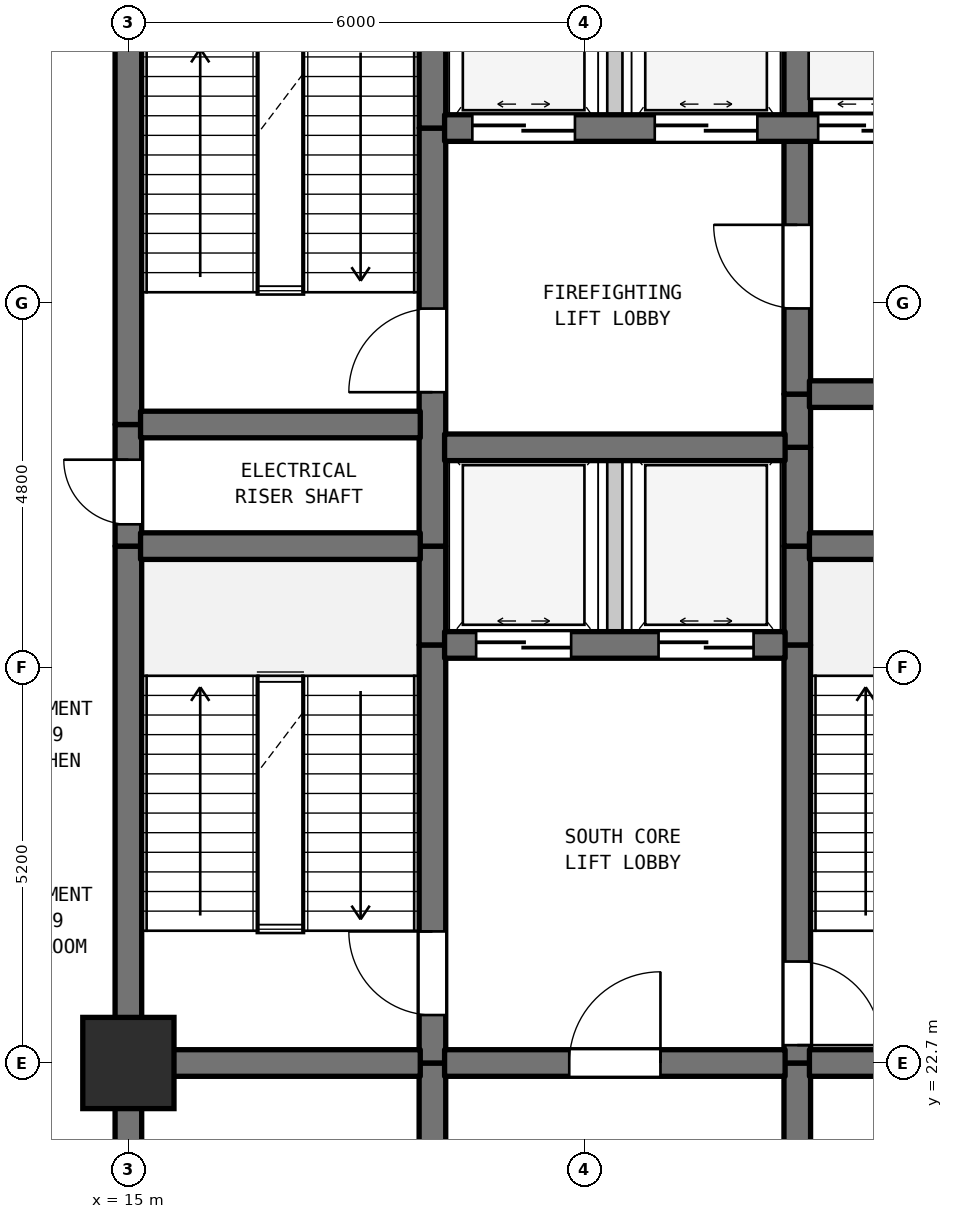
"""IFC4 building model, lengths in metres.
Left out: names, types, materials, properties, quantities, classifications, styles, units other than length and angle.
Written with IfcOpenShell. Run it as: python <this file> out.ifc"""

import sys

from ifc_helpers import new_model, si_unit, direction, frame, frame_2d, origin, origin_2d, place, context, subcontext, project, spatial, rectangle, extrude, element, fill, save


model = new_model("IFC4")
c1 = context("Model", 3, precision=1e-05, world=origin(), true_north=direction((0.0, 1.0)))
c2 = subcontext(c1, "Body", "Model", "MODEL_VIEW")
j1 = project(units=[si_unit("LENGTHUNIT", "METRE"), si_unit("PLANEANGLEUNIT", "RADIAN")], contexts=[c1])
p1 = place(None, origin())
s1 = spatial("IfcSite", under=j1, at=p1, CompositionType="ELEMENT")
p2 = place(p1, origin())
s2 = spatial("IfcBuilding", under=s1, at=p2, CompositionType="ELEMENT")
p3 = place(p2, frame((0.0, 0.0, 81.2)))
s3 = spatial("IfcBuildingStorey", under=s2, at=p3, CompositionType="ELEMENT", Elevation=81.2)
p4 = place(p3, frame((15.0, 22.7, 0.0), z_axis=(0.0, 0.0, 1.0), x_axis=(1.0, 0.0, 0.0)))
e1 = element("IfcColumn", 1, at=p4, inside=s3, PredefinedType="COLUMN", context=c2, shape_type="SweptSolid", body=[
    extrude(rectangle(XDim=1.2, YDim=1.2, at=origin_2d()), origin(), (0.0, 0.0, 1.0), 5.2),
])
p5 = place(p3, frame((15.0, 19.5, 0.0), z_axis=(0.0, 0.0, 1.0), x_axis=(0.0, 1.0, 0.0)))
e2 = element("IfcWall", 2, at=p5, inside=s3, PredefinedType="SHEAR", context=c2, shape_type="SweptSolid", body=[
    extrude(rectangle(XDim=3.2, YDim=0.35, at=frame_2d((1.6, 0.0))), origin(), (0.0, 0.0, 1.0), 4.885),
])
p6 = place(p3, frame((15.0, 22.7, 0.0), z_axis=(0.0, 0.0, 1.0), x_axis=(0.0, 1.0, 0.0)))
e3 = element("IfcWall", 3, at=p6, inside=s3, PredefinedType="SHEAR", context=c2, shape_type="SweptSolid", body=[
    extrude(rectangle(XDim=6.8, YDim=0.35, at=frame_2d((3.4, 0.0))), origin(), (0.0, 0.0, 1.0), 4.885),
])
p7 = place(p3, frame((15.0, 29.5, 0.0), z_axis=(0.0, 0.0, 1.0), x_axis=(0.0, 1.0, 0.0)))
e4 = element("IfcWall", 4, at=p7, inside=s3, PredefinedType="SHEAR", context=c2, shape_type="SweptSolid", body=[
    extrude(rectangle(XDim=1.6, YDim=0.35, at=frame_2d((0.8, 0.0))), origin(), (0.0, 0.0, 1.0), 4.885),
])
p8 = place(p7, frame((0.287, 0.0, 0.0)))
e5 = element("IfcOpeningElement", 5, at=p8, cuts=e4, PredefinedType="OPENING", context=c2, shape_type="SweptSolid", body=[
    extrude(rectangle(XDim=0.85, YDim=2.1, at=frame_2d((0.425, 1.05))), frame((0.0, 0.185, 0.0), z_axis=(0.0, -1.0, 0.0), x_axis=(1.0, 0.0, 0.0)), (0.0, 0.0, 1.0), 0.37),
])
p9 = place(p3, frame((15.0, 31.1, 0.0), z_axis=(0.0, 0.0, 1.0), x_axis=(0.0, 1.0, 0.0)))
e6 = element("IfcWall", 6, at=p9, inside=s3, PredefinedType="SHEAR", context=c2, shape_type="SweptSolid", body=[
    extrude(rectangle(XDim=6.8, YDim=0.35, at=frame_2d((3.4, 0.0))), origin(), (0.0, 0.0, 1.0), 4.885),
])
p10 = place(p3, frame((19.0, 19.5, 0.0), z_axis=(0.0, 0.0, 1.0), x_axis=(0.0, 1.0, 0.0)))
e7 = element("IfcWall", 7, at=p10, inside=s3, PredefinedType="SHEAR", context=c2, shape_type="SweptSolid", body=[
    extrude(rectangle(XDim=3.2, YDim=0.35, at=frame_2d((1.6, 0.0))), origin(), (0.0, 0.0, 1.0), 4.885),
])
p11 = place(p3, frame((19.0, 22.7, 0.0), z_axis=(0.0, 0.0, 1.0), x_axis=(0.0, 1.0, 0.0)))
e8 = element("IfcWall", 8, at=p11, inside=s3, PredefinedType="SHEAR", context=c2, shape_type="SweptSolid", body=[
    extrude(rectangle(XDim=5.5, YDim=0.35, at=frame_2d((2.75, 0.0))), origin(), (0.0, 0.0, 1.0), 4.885),
])
p12 = place(p11, frame((0.631, 0.0, 0.0)))
e9 = element("IfcOpeningElement", 9, at=p12, cuts=e8, PredefinedType="OPENING", context=c2, shape_type="SweptSolid", body=[
    extrude(rectangle(XDim=1.1, YDim=2.15, at=frame_2d((0.55, 1.075))), frame((0.0, 0.185, 0.0), z_axis=(0.0, -1.0, 0.0), x_axis=(1.0, 0.0, 0.0)), (0.0, 0.0, 1.0), 0.37),
])
p13 = place(p3, frame((19.0, 28.2, 0.0), z_axis=(0.0, 0.0, 1.0), x_axis=(0.0, 1.0, 0.0)))
e10 = element("IfcWall", 10, at=p13, inside=s3, PredefinedType="SHEAR", context=c2, shape_type="SweptSolid", body=[
    extrude(rectangle(XDim=1.3, YDim=0.35, at=frame_2d((0.65, 0.0))), origin(), (0.0, 0.0, 1.0), 4.885),
])
p14 = place(p3, frame((19.0, 29.5, 0.0), z_axis=(0.0, 0.0, 1.0), x_axis=(0.0, 1.0, 0.0)))
e11 = element("IfcWall", 11, at=p14, inside=s3, PredefinedType="SHEAR", context=c2, shape_type="SweptSolid", body=[
    extrude(rectangle(XDim=5.5, YDim=0.35, at=frame_2d((2.75, 0.0))), origin(), (0.0, 0.0, 1.0), 4.885),
])
p15 = place(p14, frame((2.025, 0.0, 0.0)))
e12 = element("IfcOpeningElement", 12, at=p15, cuts=e11, PredefinedType="OPENING", context=c2, shape_type="SweptSolid", body=[
    extrude(rectangle(XDim=1.1, YDim=2.15, at=frame_2d((0.55, 1.075))), frame((0.0, 0.185, 0.0), z_axis=(0.0, -1.0, 0.0), x_axis=(1.0, 0.0, 0.0)), (0.0, 0.0, 1.0), 0.37),
])
p16 = place(p3, frame((19.0, 35.0, 0.0), z_axis=(0.0, 0.0, 1.0), x_axis=(0.0, 1.0, 0.0)))
e13 = element("IfcWall", 13, at=p16, inside=s3, PredefinedType="SHEAR", context=c2, shape_type="SweptSolid", body=[
    extrude(rectangle(XDim=2.9, YDim=0.35, at=frame_2d((1.45, 0.0))), origin(), (0.0, 0.0, 1.0), 4.885),
])
p17 = place(p3, frame((21.4, 28.2, 0.0), z_axis=(0.0, 0.0, 1.0), x_axis=(0.0, 1.0, 0.0)))
e14 = element("IfcWall", 14, at=p17, inside=s3, PredefinedType="STANDARD", context=c2, shape_type="SweptSolid", body=[
    extrude(rectangle(XDim=2.6, YDim=0.2, at=frame_2d((1.3, 0.0))), origin(), (0.0, 0.0, 1.0), 4.885),
])
p18 = place(p3, frame((21.4, 35.0, 0.0), z_axis=(0.0, 0.0, 1.0), x_axis=(0.0, 1.0, 0.0)))
e15 = element("IfcWall", 15, at=p18, inside=s3, PredefinedType="STANDARD", context=c2, shape_type="SweptSolid", body=[
    extrude(rectangle(XDim=2.9, YDim=0.2, at=frame_2d((1.45, 0.0))), origin(), (0.0, 0.0, 1.0), 4.885),
])
p19 = place(p3, frame((23.8, 19.5, 0.0), z_axis=(0.0, 0.0, 1.0), x_axis=(0.0, 1.0, 0.0)))
e16 = element("IfcWall", 16, at=p19, inside=s3, PredefinedType="SHEAR", context=c2, shape_type="SweptSolid", body=[
    extrude(rectangle(XDim=3.2, YDim=0.35, at=frame_2d((1.6, 0.0))), origin(), (0.0, 0.0, 1.0), 4.885),
])
p20 = place(p3, frame((23.8, 22.7, 0.0), z_axis=(0.0, 0.0, 1.0), x_axis=(0.0, 1.0, 0.0)))
e17 = element("IfcWall", 17, at=p20, inside=s3, PredefinedType="SHEAR", context=c2, shape_type="SweptSolid", body=[
    extrude(rectangle(XDim=5.5, YDim=0.35, at=frame_2d((2.75, 0.0))), origin(), (0.0, 0.0, 1.0), 4.885),
])
p21 = place(p20, frame((0.235, 0.0, 0.0)))
e18 = element("IfcOpeningElement", 18, at=p21, cuts=e17, PredefinedType="OPENING", context=c2, shape_type="SweptSolid", body=[
    extrude(rectangle(XDim=1.1, YDim=2.15, at=frame_2d((0.55, 1.075))), frame((0.0, 0.185, 0.0), z_axis=(0.0, -1.0, 0.0), x_axis=(1.0, 0.0, 0.0)), (0.0, 0.0, 1.0), 0.37),
])
for number, where, z_axis, x_axis in (
    (19, (23.8, 28.2, 0.0), (0.0, 0.0, 1.0), (0.0, 1.0, 0.0)),
    (20, (23.8, 29.5, 0.0), (0.0, 0.0, 1.0), (0.0, 1.0, 0.0)),
):
    element("IfcWall", number, at=place(p3, frame(where, z_axis=z_axis, x_axis=x_axis)), inside=s3, PredefinedType="SHEAR", context=c2, shape_type="SweptSolid", body=[
        extrude(rectangle(XDim=1.3, YDim=0.35, at=frame_2d((0.65, 0.0))), origin(), (0.0, 0.0, 1.0), 4.885),
    ])
p22 = place(p3, frame((23.8, 30.8, 0.0), z_axis=(0.0, 0.0, 1.0), x_axis=(0.0, 1.0, 0.0)))
e21 = element("IfcWall", 21, at=p22, inside=s3, PredefinedType="SHEAR", context=c2, shape_type="SweptSolid", body=[
    extrude(rectangle(XDim=0.7, YDim=0.35, at=frame_2d((0.35, 0.0))), origin(), (0.0, 0.0, 1.0), 4.885),
])
p23 = place(p3, frame((23.8, 31.5, 0.0), z_axis=(0.0, 0.0, 1.0), x_axis=(0.0, 1.0, 0.0)))
e22 = element("IfcWall", 22, at=p23, inside=s3, PredefinedType="SHEAR", context=c2, shape_type="SweptSolid", body=[
    extrude(rectangle(XDim=3.5, YDim=0.35, at=frame_2d((1.75, 0.0))), origin(), (0.0, 0.0, 1.0), 4.885),
])
p24 = place(p23, frame((1.127, 0.0, 0.0)))
e23 = element("IfcOpeningElement", 23, at=p24, cuts=e22, PredefinedType="OPENING", context=c2, shape_type="SweptSolid", body=[
    extrude(rectangle(XDim=1.1, YDim=2.15, at=frame_2d((0.55, 1.075))), frame((0.0, 0.185, 0.0), z_axis=(0.0, -1.0, 0.0), x_axis=(1.0, 0.0, 0.0)), (0.0, 0.0, 1.0), 0.37),
])
p25 = place(p3, frame((23.8, 35.0, 0.0), z_axis=(0.0, 0.0, 1.0), x_axis=(0.0, 1.0, 0.0)))
e24 = element("IfcWall", 24, at=p25, inside=s3, PredefinedType="SHEAR", context=c2, shape_type="SweptSolid", body=[
    extrude(rectangle(XDim=2.9, YDim=0.35, at=frame_2d((1.45, 0.0))), origin(), (0.0, 0.0, 1.0), 4.885),
])
p26 = place(p3, frame((15.16, 22.7, 0.0), z_axis=(0.0, 0.0, 1.0), x_axis=(1.0, 0.0, 0.0)))
e25 = element("IfcWall", 25, at=p26, inside=s3, PredefinedType="SHEAR", context=c2, shape_type="SweptSolid", body=[
    extrude(rectangle(XDim=3.68, YDim=0.35, at=frame_2d((1.84, 0.0))), origin(), (0.0, 0.0, 1.0), 4.885),
])
p27 = place(p3, frame((19.16, 22.7, 0.0), z_axis=(0.0, 0.0, 1.0), x_axis=(1.0, 0.0, 0.0)))
e26 = element("IfcWall", 26, at=p27, inside=s3, PredefinedType="SHEAR", context=c2, shape_type="SweptSolid", body=[
    extrude(rectangle(XDim=4.48, YDim=0.35, at=frame_2d((2.24, 0.0))), origin(), (0.0, 0.0, 1.0), 4.885),
])
p28 = place(p27, frame((1.64, 0.0, 0.0)))
e27 = element("IfcOpeningElement", 27, at=p28, cuts=e26, PredefinedType="OPENING", context=c2, shape_type="SweptSolid", body=[
    extrude(rectangle(XDim=1.2, YDim=2.2, at=frame_2d((0.6, 1.1))), frame((0.0, 0.185, 0.0), z_axis=(0.0, -1.0, 0.0), x_axis=(1.0, 0.0, 0.0)), (0.0, 0.0, 1.0), 0.37),
])
p29 = place(p3, frame((23.96, 22.7, 0.0), z_axis=(0.0, 0.0, 1.0), x_axis=(1.0, 0.0, 0.0)))
e28 = element("IfcWall", 28, at=p29, inside=s3, PredefinedType="SHEAR", context=c2, shape_type="SweptSolid", body=[
    extrude(rectangle(XDim=1.855, YDim=0.35, at=frame_2d((0.927, 0.0))), origin(), (0.0, 0.0, 1.0), 4.885),
])
p30 = place(p3, frame((19.16, 28.2, 0.0), z_axis=(0.0, 0.0, 1.0), x_axis=(1.0, 0.0, 0.0)))
e29 = element("IfcWall", 29, at=p30, inside=s3, PredefinedType="SHEAR", context=c2, shape_type="SweptSolid", body=[
    extrude(rectangle(XDim=4.48, YDim=0.35, at=frame_2d((2.24, 0.0))), origin(), (0.0, 0.0, 1.0), 4.885),
])
p31 = place(p30, frame((0.415, 0.0, 0.0)))
e30 = element("IfcOpeningElement", 30, at=p31, cuts=e29, PredefinedType="OPENING", context=c2, shape_type="SweptSolid", body=[
    extrude(rectangle(XDim=1.25, YDim=2.2, at=frame_2d((0.625, 1.1))), frame((0.0, 0.185, 0.0), z_axis=(0.0, -1.0, 0.0), x_axis=(1.0, 0.0, 0.0)), (0.0, 0.0, 1.0), 0.37),
])
p32 = place(p30, frame((2.815, 0.0, 0.0)))
e31 = element("IfcOpeningElement", 31, at=p32, cuts=e29, PredefinedType="OPENING", context=c2, shape_type="SweptSolid", body=[
    extrude(rectangle(XDim=1.25, YDim=2.2, at=frame_2d((0.625, 1.1))), frame((0.0, 0.185, 0.0), z_axis=(0.0, -1.0, 0.0), x_axis=(1.0, 0.0, 0.0)), (0.0, 0.0, 1.0), 0.37),
])
p33 = place(p3, frame((15.16, 29.5, 0.0), z_axis=(0.0, 0.0, 1.0), x_axis=(1.0, 0.0, 0.0)))
e32 = element("IfcWall", 32, at=p33, inside=s3, PredefinedType="SHEAR", context=c2, shape_type="SweptSolid", body=[
    extrude(rectangle(XDim=3.68, YDim=0.35, at=frame_2d((1.84, 0.0))), origin(), (0.0, 0.0, 1.0), 4.885),
])
p34 = place(p3, frame((23.96, 29.5, 0.0), z_axis=(0.0, 0.0, 1.0), x_axis=(1.0, 0.0, 0.0)))
e33 = element("IfcWall", 33, at=p34, inside=s3, PredefinedType="SHEAR", context=c2, shape_type="SweptSolid", body=[
    extrude(rectangle(XDim=3.18, YDim=0.35, at=frame_2d((1.59, 0.0))), origin(), (0.0, 0.0, 1.0), 4.885),
])
p35 = place(p3, frame((19.16, 30.8, 0.0), z_axis=(0.0, 0.0, 1.0), x_axis=(1.0, 0.0, 0.0)))
e34 = element("IfcWall", 34, at=p35, inside=s3, PredefinedType="SHEAR", context=c2, shape_type="SweptSolid", body=[
    extrude(rectangle(XDim=4.48, YDim=0.35, at=frame_2d((2.24, 0.0))), origin(), (0.0, 0.0, 1.0), 4.885),
])
p36 = place(p3, frame((15.16, 31.1, 0.0), z_axis=(0.0, 0.0, 1.0), x_axis=(1.0, 0.0, 0.0)))
e35 = element("IfcWall", 35, at=p36, inside=s3, PredefinedType="SHEAR", context=c2, shape_type="SweptSolid", body=[
    extrude(rectangle(XDim=3.68, YDim=0.35, at=frame_2d((1.84, 0.0))), origin(), (0.0, 0.0, 1.0), 4.885),
])
p37 = place(p3, frame((23.96, 31.5, 0.0), z_axis=(0.0, 0.0, 1.0), x_axis=(1.0, 0.0, 0.0)))
e36 = element("IfcWall", 36, at=p37, inside=s3, PredefinedType="SHEAR", context=c2, shape_type="SweptSolid", body=[
    extrude(rectangle(XDim=3.18, YDim=0.35, at=frame_2d((1.59, 0.0))), origin(), (0.0, 0.0, 1.0), 4.885),
])
p38 = place(p37, frame((1.094, 0.0, 0.0)))
e37 = element("IfcOpeningElement", 37, at=p38, cuts=e36, PredefinedType="OPENING", context=c2, shape_type="SweptSolid", body=[
    extrude(rectangle(XDim=0.85, YDim=2.1, at=frame_2d((0.425, 1.05))), frame((0.0, 0.185, 0.0), z_axis=(0.0, -1.0, 0.0), x_axis=(1.0, 0.0, 0.0)), (0.0, 0.0, 1.0), 0.37),
])
p39 = place(p3, frame((19.16, 35.0, 0.0), z_axis=(0.0, 0.0, 1.0), x_axis=(1.0, 0.0, 0.0)))
e38 = element("IfcWall", 38, at=p39, inside=s3, PredefinedType="SHEAR", context=c2, shape_type="SweptSolid", body=[
    extrude(rectangle(XDim=11.48, YDim=0.35, at=frame_2d((5.74, 0.0))), origin(), (0.0, 0.0, 1.0), 4.885),
])
p40 = place(p39, frame((0.365, 0.0, 0.0)))
e39 = element("IfcOpeningElement", 39, at=p40, cuts=e38, PredefinedType="OPENING", context=c2, shape_type="SweptSolid", body=[
    extrude(rectangle(XDim=1.35, YDim=2.2, at=frame_2d((0.675, 1.1))), frame((0.0, 0.185, 0.0), z_axis=(0.0, -1.0, 0.0), x_axis=(1.0, 0.0, 0.0)), (0.0, 0.0, 1.0), 0.37),
])
p41 = place(p39, frame((2.765, 0.0, 0.0)))
e40 = element("IfcOpeningElement", 40, at=p41, cuts=e38, PredefinedType="OPENING", context=c2, shape_type="SweptSolid", body=[
    extrude(rectangle(XDim=1.35, YDim=2.2, at=frame_2d((0.675, 1.1))), frame((0.0, 0.185, 0.0), z_axis=(0.0, -1.0, 0.0), x_axis=(1.0, 0.0, 0.0)), (0.0, 0.0, 1.0), 0.37),
])
p42 = place(p39, frame((4.915, 0.0, 0.0)))
e41 = element("IfcOpeningElement", 41, at=p42, cuts=e38, PredefinedType="OPENING", context=c2, shape_type="SweptSolid", body=[
    extrude(rectangle(XDim=1.2, YDim=2.2, at=frame_2d((0.6, 1.1))), frame((0.0, 0.185, 0.0), z_axis=(0.0, -1.0, 0.0), x_axis=(1.0, 0.0, 0.0)), (0.0, 0.0, 1.0), 0.37),
])
p43 = place(p39, frame((6.665, 0.0, 0.0)))
e42 = element("IfcOpeningElement", 42, at=p43, cuts=e38, PredefinedType="OPENING", context=c2, shape_type="SweptSolid", body=[
    extrude(rectangle(XDim=1.2, YDim=2.2, at=frame_2d((0.6, 1.1))), frame((0.0, 0.185, 0.0), z_axis=(0.0, -1.0, 0.0), x_axis=(1.0, 0.0, 0.0)), (0.0, 0.0, 1.0), 0.37),
])
p44 = place(p39, frame((8.415, 0.0, 0.0)))
e43 = element("IfcOpeningElement", 43, at=p44, cuts=e38, PredefinedType="OPENING", context=c2, shape_type="SweptSolid", body=[
    extrude(rectangle(XDim=1.2, YDim=2.2, at=frame_2d((0.6, 1.1))), frame((0.0, 0.185, 0.0), z_axis=(0.0, -1.0, 0.0), x_axis=(1.0, 0.0, 0.0)), (0.0, 0.0, 1.0), 0.37),
])
p45 = place(p39, frame((10.16, 0.0, 0.0)))
e44 = element("IfcOpeningElement", 44, at=p45, cuts=e38, PredefinedType="OPENING", context=c2, shape_type="SweptSolid", body=[
    extrude(rectangle(XDim=1.2, YDim=2.2, at=frame_2d((0.6, 1.1))), frame((0.0, 0.185, 0.0), z_axis=(0.0, -1.0, 0.0), x_axis=(1.0, 0.0, 0.0)), (0.0, 0.0, 1.0), 0.37),
])
p46 = place(p8, origin())
e45 = element("IfcDoor", 45, at=p46, inside=s3, OperationType="SINGLE_SWING_RIGHT", PredefinedType="DOOR", context=c2, shape_type="SweptSolid", body=[
    extrude(rectangle(XDim=0.85, YDim=2.1, at=frame_2d((0.425, 1.05))), frame((0.0, 0.025, 0.0), z_axis=(0.0, -1.0, 0.0), x_axis=(1.0, 0.0, 0.0)), (0.0, 0.0, 1.0), 0.05),
])
fill(e5, e45)
p47 = place(p12, origin())
e46 = element("IfcDoor", 46, at=p47, inside=s3, OperationType="SINGLE_SWING_RIGHT", PredefinedType="DOOR", context=c2, shape_type="SweptSolid", body=[
    extrude(rectangle(XDim=1.1, YDim=2.15, at=frame_2d((0.55, 1.075))), frame((0.0, 0.025, 0.0), z_axis=(0.0, -1.0, 0.0), x_axis=(1.0, 0.0, 0.0)), (0.0, 0.0, 1.0), 0.05),
])
fill(e9, e46)
p48 = place(p15, origin())
e47 = element("IfcDoor", 47, at=p48, inside=s3, OperationType="SINGLE_SWING_LEFT", PredefinedType="DOOR", context=c2, shape_type="SweptSolid", body=[
    extrude(rectangle(XDim=1.1, YDim=2.15, at=frame_2d((0.55, 1.075))), frame((0.0, 0.025, 0.0), z_axis=(0.0, -1.0, 0.0), x_axis=(1.0, 0.0, 0.0)), (0.0, 0.0, 1.0), 0.05),
])
fill(e12, e47)
p49 = place(p21, frame((1.1, 0.0, 0.0), z_axis=(0.0, 0.0, 1.0), x_axis=(-1.0, 0.0, 0.0)))
e48 = element("IfcDoor", 48, at=p49, inside=s3, OperationType="SINGLE_SWING_LEFT", PredefinedType="DOOR", context=c2, shape_type="SweptSolid", body=[
    extrude(rectangle(XDim=1.1, YDim=2.15, at=frame_2d((0.55, 1.075))), frame((0.0, 0.025, 0.0), z_axis=(0.0, -1.0, 0.0), x_axis=(1.0, 0.0, 0.0)), (0.0, 0.0, 1.0), 0.05),
])
fill(e18, e48)
p50 = place(p24, origin())
e49 = element("IfcDoor", 49, at=p50, inside=s3, OperationType="SINGLE_SWING_RIGHT", PredefinedType="DOOR", context=c2, shape_type="SweptSolid", body=[
    extrude(rectangle(XDim=1.1, YDim=2.15, at=frame_2d((0.55, 1.075))), frame((0.0, 0.025, 0.0), z_axis=(0.0, -1.0, 0.0), x_axis=(1.0, 0.0, 0.0)), (0.0, 0.0, 1.0), 0.05),
])
fill(e23, e49)
p51 = place(p28, origin())
e50 = element("IfcDoor", 50, at=p51, inside=s3, OperationType="SINGLE_SWING_RIGHT", PredefinedType="DOOR", context=c2, shape_type="SweptSolid", body=[
    extrude(rectangle(XDim=1.2, YDim=2.2, at=frame_2d((0.6, 1.1))), frame((0.0, 0.025, 0.0), z_axis=(0.0, -1.0, 0.0), x_axis=(1.0, 0.0, 0.0)), (0.0, 0.0, 1.0), 0.05),
])
fill(e27, e50)
p52 = place(p31, origin())
e51 = element("IfcDoor", 51, at=p52, inside=s3, OperationType="DOUBLE_DOOR_SLIDING", PredefinedType="DOOR", context=c2, shape_type="SweptSolid", body=[
    extrude(rectangle(XDim=1.25, YDim=2.2, at=frame_2d((0.625, 1.1))), frame((0.0, 0.025, 0.0), z_axis=(0.0, -1.0, 0.0), x_axis=(1.0, 0.0, 0.0)), (0.0, 0.0, 1.0), 0.05),
])
fill(e30, e51)
p53 = place(p32, origin())
e52 = element("IfcDoor", 52, at=p53, inside=s3, OperationType="DOUBLE_DOOR_SLIDING", PredefinedType="DOOR", context=c2, shape_type="SweptSolid", body=[
    extrude(rectangle(XDim=1.25, YDim=2.2, at=frame_2d((0.625, 1.1))), frame((0.0, 0.025, 0.0), z_axis=(0.0, -1.0, 0.0), x_axis=(1.0, 0.0, 0.0)), (0.0, 0.0, 1.0), 0.05),
])
fill(e31, e52)
p54 = place(p40, origin())
e53 = element("IfcDoor", 53, at=p54, inside=s3, OperationType="DOUBLE_DOOR_SLIDING", PredefinedType="DOOR", context=c2, shape_type="SweptSolid", body=[
    extrude(rectangle(XDim=1.35, YDim=2.2, at=frame_2d((0.675, 1.1))), frame((0.0, 0.025, 0.0), z_axis=(0.0, -1.0, 0.0), x_axis=(1.0, 0.0, 0.0)), (0.0, 0.0, 1.0), 0.05),
])
fill(e39, e53)
p55 = place(p41, origin())
e54 = element("IfcDoor", 54, at=p55, inside=s3, OperationType="DOUBLE_DOOR_SLIDING", PredefinedType="DOOR", context=c2, shape_type="SweptSolid", body=[
    extrude(rectangle(XDim=1.35, YDim=2.2, at=frame_2d((0.675, 1.1))), frame((0.0, 0.025, 0.0), z_axis=(0.0, -1.0, 0.0), x_axis=(1.0, 0.0, 0.0)), (0.0, 0.0, 1.0), 0.05),
])
fill(e40, e54)
p56 = place(p42, origin())
e55 = element("IfcDoor", 55, at=p56, inside=s3, OperationType="DOUBLE_DOOR_SLIDING", PredefinedType="DOOR", context=c2, shape_type="SweptSolid", body=[
    extrude(rectangle(XDim=1.2, YDim=2.2, at=frame_2d((0.6, 1.1))), frame((0.0, 0.025, 0.0), z_axis=(0.0, -1.0, 0.0), x_axis=(1.0, 0.0, 0.0)), (0.0, 0.0, 1.0), 0.05),
])
fill(e41, e55)
save(model, sys.argv[1])
